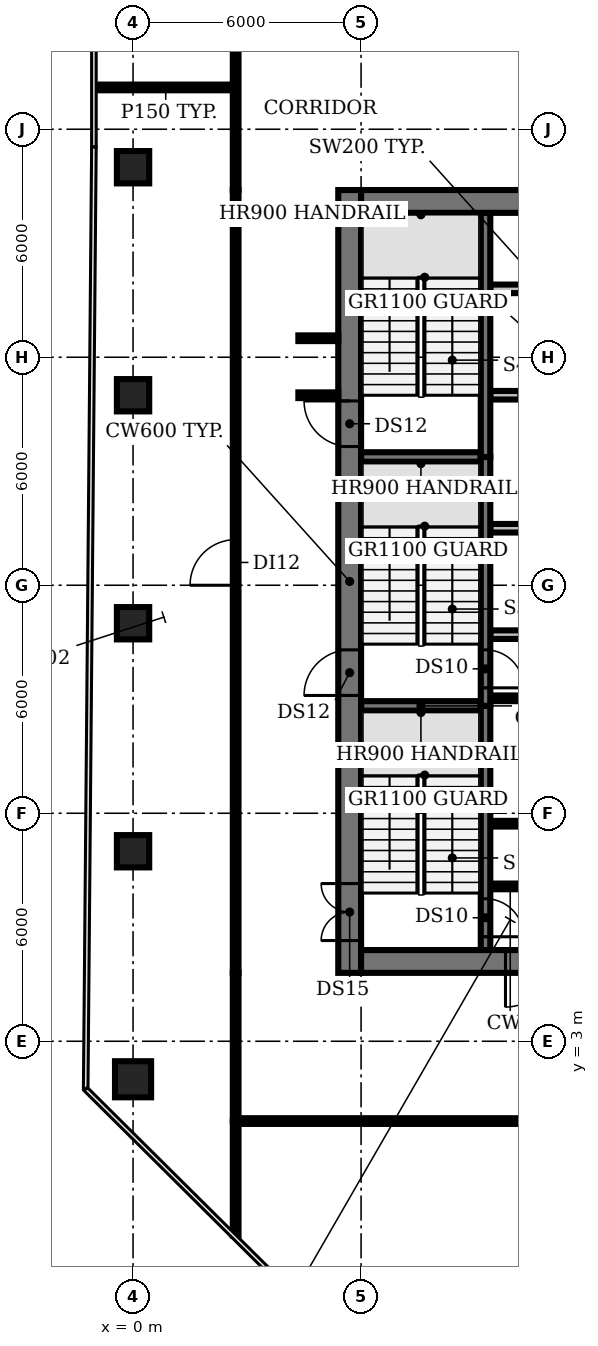
"""IFC4 building model, lengths in metres.
Left out: names, types, materials, properties, quantities, classifications, styles, units other than length and angle.
Written with IfcOpenShell. Run it as: python <this file> out.ifc"""

import sys

from ifc_helpers import new_model, si_unit, direction, frame, frame_2d, origin, origin_2d, place, context, subcontext, project, spatial, rectangle, circle, extrude, element, fill, save


model = new_model("IFC4")
c1 = context("Model", 3, precision=1e-05, world=origin(), true_north=direction((0.0, 1.0)))
c2 = subcontext(c1, "Body", "Model", "MODEL_VIEW")
j1 = project(units=[si_unit("LENGTHUNIT", "METRE"), si_unit("PLANEANGLEUNIT", "RADIAN")], contexts=[c1])
p1 = place(None, origin())
s1 = spatial("IfcSite", under=j1, at=p1, CompositionType="ELEMENT")
p2 = place(p1, origin())
s2 = spatial("IfcBuilding", under=s1, at=p2, CompositionType="ELEMENT")
p3 = place(p2, frame((0.0, 0.0, 167.6)))
s3 = spatial("IfcBuildingStorey", under=s2, at=p3, CompositionType="ELEMENT", Elevation=167.6)
p4 = place(p3, frame((0.0, 2.0, 0.0), z_axis=(0.0, 0.0, 1.0), x_axis=(1.0, 0.0, 0.0)))
e1 = element("IfcColumn", 1, at=p4, inside=s3, PredefinedType="COLUMN", context=c2, shape_type="SweptSolid", body=[
    extrude(circle(Radius=0.475, at=origin_2d()), origin(), (0.0, 0.0, 1.0), 3.85),
])
for number, where, z_axis, x_axis in (
    (2, (0.0, 8.0, 0.0), (0.0, 0.0, 1.0), (1.0, 0.0, 0.0)),
    (3, (0.0, 14.0, 0.0), (0.0, 0.0, 1.0), (1.0, 0.0, 0.0)),
    (4, (0.0, 20.0, 0.0), (0.0, 0.0, 1.0), (1.0, 0.0, 0.0)),
    (5, (0.0, 26.0, 0.0), (0.0, 0.0, 1.0), (1.0, 0.0, 0.0)),
):
    element("IfcColumn", number, at=place(p3, frame(where, z_axis=z_axis, x_axis=x_axis)), inside=s3, PredefinedType="COLUMN", context=c2, shape_type="SweptSolid", body=[
        extrude(rectangle(XDim=0.85, YDim=0.85, at=origin_2d()), origin(), (0.0, 0.0, 1.0), 3.85),
    ])
for number, where, z_axis, x_axis in (
    (6, (9.4, 7.075, 0.0), (0.0, 0.0, 1.0), (1.0, 0.0, 0.0)),
    (7, (9.4, 8.725, 0.0), (0.0, 0.0, 1.0), (1.0, 0.0, 0.0)),
    (8, (9.4, 10.375, 0.0), (0.0, 0.0, 1.0), (1.0, 0.0, 0.0)),
):
    element("IfcWall", number, at=place(p3, frame(where, z_axis=z_axis, x_axis=x_axis)), inside=s3, PredefinedType="SHEAR", context=c2, shape_type="SweptSolid", body=[
        extrude(rectangle(XDim=1.05, YDim=0.15, at=frame_2d((0.525, 0.0))), origin(), (0.0, 0.0, 1.0), 3.85),
    ])
p5 = place(p3, frame((6.0, 11.825, 0.0), z_axis=(0.0, 0.0, 1.0), x_axis=(1.0, 0.0, 0.0)))
e9 = element("IfcWall", 9, at=p5, inside=s3, PredefinedType="SHEAR", context=c2, shape_type="SweptSolid", body=[
    extrude(rectangle(XDim=3.15, YDim=0.25, at=frame_2d((1.575, 0.0))), origin(), (0.0, 0.0, 1.0), 3.85),
])
p6 = place(p3, frame((9.4, 12.025, 0.0), z_axis=(0.0, 0.0, 1.0), x_axis=(1.0, 0.0, 0.0)))
e10 = element("IfcWall", 10, at=p6, inside=s3, PredefinedType="SHEAR", context=c2, shape_type="SweptSolid", body=[
    extrude(rectangle(XDim=1.05, YDim=0.15, at=frame_2d((0.525, 0.0))), origin(), (0.0, 0.0, 1.0), 3.85),
])
p7 = place(p3, frame((9.4, 13.7, 0.0), z_axis=(0.0, 0.0, 1.0), x_axis=(1.0, 0.0, 0.0)))
e11 = element("IfcWall", 11, at=p7, inside=s3, PredefinedType="PARTITIONING", context=c2, shape_type="SweptSolid", body=[
    extrude(rectangle(XDim=4.0, YDim=0.225, at=frame_2d((2.0, 0.0))), origin(), (0.0, 0.0, 1.0), 3.85),
])
p8 = place(p3, frame((9.4, 16.5, 0.0), z_axis=(0.0, 0.0, 1.0), x_axis=(1.0, 0.0, 0.0)))
e12 = element("IfcWall", 12, at=p8, inside=s3, PredefinedType="PARTITIONING", context=c2, shape_type="SweptSolid", body=[
    extrude(rectangle(XDim=14.6, YDim=0.225, at=frame_2d((7.3, 0.0))), origin(), (0.0, 0.0, 1.0), 3.85),
])
p9 = place(p8, frame((1.6, 0.0, 0.0)))
e13 = element("IfcOpeningElement", 13, at=p9, cuts=e12, PredefinedType="OPENING", context=c2, shape_type="SweptSolid", body=[
    extrude(rectangle(XDim=1.0, YDim=2.1, at=frame_2d((0.5, 1.05))), frame((0.0, 0.123, 0.0), z_axis=(0.0, -1.0, 0.0), x_axis=(1.0, 0.0, 0.0)), (0.0, 0.0, 1.0), 0.245),
])
p10 = place(p8, frame((5.125, 0.0, 0.0)))
e14 = element("IfcOpeningElement", 14, at=p10, cuts=e12, PredefinedType="OPENING", context=c2, shape_type="SweptSolid", body=[
    extrude(rectangle(XDim=0.9, YDim=2.1, at=frame_2d((0.45, 1.05))), frame((0.0, 0.123, 0.0), z_axis=(0.0, -1.0, 0.0), x_axis=(1.0, 0.0, 0.0)), (0.0, 0.0, 1.0), 0.245),
])
p11 = place(p8, frame((7.675, 0.0, 0.0)))
e15 = element("IfcOpeningElement", 15, at=p11, cuts=e12, PredefinedType="OPENING", context=c2, shape_type="SweptSolid", body=[
    extrude(rectangle(XDim=0.9, YDim=2.1, at=frame_2d((0.45, 1.05))), frame((0.0, 0.123, 0.0), z_axis=(0.0, -1.0, 0.0), x_axis=(1.0, 0.0, 0.0)), (0.0, 0.0, 1.0), 0.245),
])
p12 = place(p8, frame((9.775, 0.0, 0.0)))
e16 = element("IfcOpeningElement", 16, at=p12, cuts=e12, PredefinedType="OPENING", context=c2, shape_type="SweptSolid", body=[
    extrude(rectangle(XDim=0.9, YDim=2.1, at=frame_2d((0.45, 1.05))), frame((0.0, 0.123, 0.0), z_axis=(0.0, -1.0, 0.0), x_axis=(1.0, 0.0, 0.0)), (0.0, 0.0, 1.0), 0.245),
])
p13 = place(p8, frame((11.647, 0.0, 0.0)))
e17 = element("IfcOpeningElement", 17, at=p13, cuts=e12, PredefinedType="OPENING", context=c2, shape_type="SweptSolid", body=[
    extrude(rectangle(XDim=0.9, YDim=2.1, at=frame_2d((0.45, 1.05))), frame((0.0, 0.123, 0.0), z_axis=(0.0, -1.0, 0.0), x_axis=(1.0, 0.0, 0.0)), (0.0, 0.0, 1.0), 0.245),
])
p14 = place(p8, frame((13.423, 0.0, 0.0)))
e18 = element("IfcOpeningElement", 18, at=p14, cuts=e12, PredefinedType="OPENING", context=c2, shape_type="SweptSolid", body=[
    extrude(rectangle(XDim=0.9, YDim=2.1, at=frame_2d((0.45, 1.05))), frame((0.0, 0.123, 0.0), z_axis=(0.0, -1.0, 0.0), x_axis=(1.0, 0.0, 0.0)), (0.0, 0.0, 1.0), 0.245),
])
p15 = place(p3, frame((6.0, 18.375, 0.0), z_axis=(0.0, 0.0, 1.0), x_axis=(1.0, 0.0, 0.0)))
e19 = element("IfcWall", 19, at=p15, inside=s3, PredefinedType="SHEAR", context=c2, shape_type="SweptSolid", body=[
    extrude(rectangle(XDim=3.15, YDim=0.25, at=frame_2d((1.575, 0.0))), origin(), (0.0, 0.0, 1.0), 3.85),
])
p16 = place(p3, frame((24.0, 20.0, 0.0), z_axis=(0.0, 0.0, 1.0), x_axis=(-1.0, 0.0, 0.0)))
e20 = element("IfcWall", 20, at=p16, inside=s3, PredefinedType="PARTITIONING", context=c2, shape_type="SweptSolid", body=[
    extrude(rectangle(XDim=14.6, YDim=0.225, at=frame_2d((7.3, 0.0))), origin(), (0.0, 0.0, 1.0), 3.85),
])
p17 = place(p16, frame((12.75, 0.0, 0.0)))
e21 = element("IfcOpeningElement", 21, at=p17, cuts=e20, PredefinedType="OPENING", context=c2, shape_type="SweptSolid", body=[
    extrude(rectangle(XDim=1.1, YDim=2.1, at=frame_2d((0.55, 1.05))), frame((0.0, 0.123, 0.0), z_axis=(0.0, -1.0, 0.0), x_axis=(1.0, 0.0, 0.0)), (0.0, 0.0, 1.0), 0.245),
])
p18 = place(p16, frame((9.95, 0.0, 0.0)))
e22 = element("IfcOpeningElement", 22, at=p18, cuts=e20, PredefinedType="OPENING", context=c2, shape_type="SweptSolid", body=[
    extrude(rectangle(XDim=1.1, YDim=2.1, at=frame_2d((0.55, 1.05))), frame((0.0, 0.123, 0.0), z_axis=(0.0, -1.0, 0.0), x_axis=(1.0, 0.0, 0.0)), (0.0, 0.0, 1.0), 0.245),
])
p19 = place(p16, frame((7.15, 0.0, 0.0)))
e23 = element("IfcOpeningElement", 23, at=p19, cuts=e20, PredefinedType="OPENING", context=c2, shape_type="SweptSolid", body=[
    extrude(rectangle(XDim=1.1, YDim=2.1, at=frame_2d((0.55, 1.05))), frame((0.0, 0.123, 0.0), z_axis=(0.0, -1.0, 0.0), x_axis=(1.0, 0.0, 0.0)), (0.0, 0.0, 1.0), 0.245),
])
p20 = place(p16, frame((4.35, 0.0, 0.0)))
e24 = element("IfcOpeningElement", 24, at=p20, cuts=e20, PredefinedType="OPENING", context=c2, shape_type="SweptSolid", body=[
    extrude(rectangle(XDim=1.1, YDim=2.1, at=frame_2d((0.55, 1.05))), frame((0.0, 0.123, 0.0), z_axis=(0.0, -1.0, 0.0), x_axis=(1.0, 0.0, 0.0)), (0.0, 0.0, 1.0), 0.245),
])
p21 = place(p16, frame((2.137, 0.0, 0.0)))
e25 = element("IfcOpeningElement", 25, at=p21, cuts=e20, PredefinedType="OPENING", context=c2, shape_type="SweptSolid", body=[
    extrude(rectangle(XDim=0.9, YDim=2.1, at=frame_2d((0.45, 1.05))), frame((0.0, 0.123, 0.0), z_axis=(0.0, -1.0, 0.0), x_axis=(1.0, 0.0, 0.0)), (0.0, 0.0, 1.0), 0.245),
])
p22 = place(p16, frame((0.363, 0.0, 0.0)))
e26 = element("IfcOpeningElement", 26, at=p22, cuts=e20, PredefinedType="OPENING", context=c2, shape_type="SweptSolid", body=[
    extrude(rectangle(XDim=0.9, YDim=2.1, at=frame_2d((0.45, 1.05))), frame((0.0, 0.123, 0.0), z_axis=(0.0, -1.0, 0.0), x_axis=(1.0, 0.0, 0.0)), (0.0, 0.0, 1.0), 0.245),
])
p23 = place(p3, frame((9.4, 22.8, 0.0), z_axis=(0.0, 0.0, 1.0), x_axis=(1.0, 0.0, 0.0)))
e27 = element("IfcWall", 27, at=p23, inside=s3, PredefinedType="PARTITIONING", context=c2, shape_type="SweptSolid", body=[
    extrude(rectangle(XDim=14.6, YDim=0.225, at=frame_2d((7.3, 0.0))), origin(), (0.0, 0.0, 1.0), 3.85),
])
p24 = place(p3, frame((9.275, 11.825, 0.0), z_axis=(0.0, 0.0, 1.0), x_axis=(0.0, -1.0, 0.0)))
e28 = element("IfcWall", 28, at=p24, inside=s3, PredefinedType="SHEAR", context=c2, shape_type="SweptSolid", body=[
    extrude(rectangle(XDim=6.425, YDim=0.25, at=frame_2d((3.212, 0.0))), origin(), (0.0, 0.0, 1.0), 3.85),
])
p25 = place(p24, frame((5.075, 0.0, 0.0)))
e29 = element("IfcOpeningElement", 29, at=p25, cuts=e28, PredefinedType="OPENING", context=c2, shape_type="SweptSolid", body=[
    extrude(rectangle(XDim=1.0, YDim=2.1, at=frame_2d((0.5, 1.05))), frame((0.0, 0.135, 0.0), z_axis=(0.0, -1.0, 0.0), x_axis=(1.0, 0.0, 0.0)), (0.0, 0.0, 1.0), 0.27),
])
p26 = place(p3, frame((9.275, 18.375, 0.0), z_axis=(0.0, 0.0, 1.0), x_axis=(0.0, -1.0, 0.0)))
e30 = element("IfcWall", 30, at=p26, inside=s3, PredefinedType="SHEAR", context=c2, shape_type="SweptSolid", body=[
    extrude(rectangle(XDim=6.55, YDim=0.25, at=frame_2d((3.275, 0.0))), origin(), (0.0, 0.0, 1.0), 3.85),
])
p27 = place(p26, frame((5.075, 0.0, 0.0)))
e31 = element("IfcOpeningElement", 31, at=p27, cuts=e30, PredefinedType="OPENING", context=c2, shape_type="SweptSolid", body=[
    extrude(rectangle(XDim=1.0, YDim=2.1, at=frame_2d((0.5, 1.05))), frame((0.0, 0.135, 0.0), z_axis=(0.0, -1.0, 0.0), x_axis=(1.0, 0.0, 0.0)), (0.0, 0.0, 1.0), 0.27),
])
p28 = place(p3, frame((9.275, 18.375, 0.0), z_axis=(0.0, 0.0, 1.0), x_axis=(0.0, 1.0, 0.0)))
e32 = element("IfcWall", 32, at=p28, inside=s3, PredefinedType="SHEAR", context=c2, shape_type="SweptSolid", body=[
    extrude(rectangle(XDim=6.425, YDim=0.25, at=frame_2d((3.212, 0.0))), origin(), (0.0, 0.0, 1.0), 3.85),
])
p29 = place(p3, frame((5.7, 4.8, 0.0), z_axis=(0.0, 0.0, 1.0), x_axis=(0.0, 1.0, 0.0)))
e33 = element("IfcWall", 33, at=p29, inside=s3, PredefinedType="SHEAR", context=c2, shape_type="SweptSolid", body=[
    extrude(rectangle(XDim=20.6, YDim=0.6, at=frame_2d((10.3, 0.0))), origin(), (0.0, 0.0, 1.0), 3.85),
])
p30 = place(p29, frame((0.85, 0.0, 0.0)))
e34 = element("IfcOpeningElement", 34, at=p30, cuts=e33, PredefinedType="OPENING", context=c2, shape_type="SweptSolid", body=[
    extrude(rectangle(XDim=1.5, YDim=2.1, at=frame_2d((0.75, 1.05))), frame((0.0, 0.31, 0.0), z_axis=(0.0, -1.0, 0.0), x_axis=(1.0, 0.0, 0.0)), (0.0, 0.0, 1.0), 0.62),
])
p31 = place(p29, frame((7.3, 0.0, 0.0)))
e35 = element("IfcOpeningElement", 35, at=p31, cuts=e33, PredefinedType="OPENING", context=c2, shape_type="SweptSolid", body=[
    extrude(rectangle(XDim=1.2, YDim=2.1, at=frame_2d((0.6, 1.05))), frame((0.0, 0.31, 0.0), z_axis=(0.0, -1.0, 0.0), x_axis=(1.0, 0.0, 0.0)), (0.0, 0.0, 1.0), 0.62),
])
p32 = place(p29, frame((13.85, 0.0, 0.0)))
e36 = element("IfcOpeningElement", 36, at=p32, cuts=e33, PredefinedType="OPENING", context=c2, shape_type="SweptSolid", body=[
    extrude(rectangle(XDim=1.2, YDim=2.1, at=frame_2d((0.6, 1.05))), frame((0.0, 0.31, 0.0), z_axis=(0.0, -1.0, 0.0), x_axis=(1.0, 0.0, 0.0)), (0.0, 0.0, 1.0), 0.62),
])
p33 = place(p3, frame((24.0, 5.1, 0.0), z_axis=(0.0, 0.0, 1.0), x_axis=(-1.0, 0.0, 0.0)))
e37 = element("IfcWall", 37, at=p33, inside=s3, PredefinedType="SHEAR", context=c2, shape_type="SweptSolid", body=[
    extrude(rectangle(XDim=18.0, YDim=0.6, at=frame_2d((9.0, 0.0))), origin(), (0.0, 0.0, 1.0), 3.85),
])
p34 = place(p33, frame((13.0, 0.0, 0.0)))
e38 = element("IfcOpeningElement", 38, at=p34, cuts=e37, PredefinedType="OPENING", context=c2, shape_type="SweptSolid", body=[
    extrude(rectangle(XDim=1.2, YDim=2.1, at=frame_2d((0.6, 1.05))), frame((0.0, 0.31, 0.0), z_axis=(0.0, -1.0, 0.0), x_axis=(1.0, 0.0, 0.0)), (0.0, 0.0, 1.0), 0.62),
])
p35 = place(p33, frame((4.9, 0.0, 0.0)))
e39 = element("IfcOpeningElement", 39, at=p35, cuts=e37, PredefinedType="OPENING", context=c2, shape_type="SweptSolid", body=[
    extrude(rectangle(XDim=1.0, YDim=2.1, at=frame_2d((0.5, 1.05))), frame((0.0, 0.31, 0.0), z_axis=(0.0, -1.0, 0.0), x_axis=(1.0, 0.0, 0.0)), (0.0, 0.0, 1.0), 0.62),
])
p36 = place(p3, frame((6.0, 25.1, 0.0), z_axis=(0.0, 0.0, 1.0), x_axis=(1.0, 0.0, 0.0)))
e40 = element("IfcWall", 40, at=p36, inside=s3, PredefinedType="SHEAR", context=c2, shape_type="SweptSolid", body=[
    extrude(rectangle(XDim=18.0, YDim=0.6, at=frame_2d((9.0, 0.0))), origin(), (0.0, 0.0, 1.0), 3.85),
])
p37 = place(p3, frame((-0.98, 28.1, 0.0), z_axis=(0.0, 0.0, 1.0), x_axis=(1.0, 0.0, 0.0)))
e41 = element("IfcWall", 41, at=p37, inside=s3, PredefinedType="PARTITIONING", context=c2, shape_type="SweptSolid", body=[
    extrude(rectangle(XDim=3.68, YDim=0.15, at=frame_2d((1.84, 0.0))), origin(), (0.0, 0.0, 1.0), 2.88),
])
p38 = place(p3, frame((2.7, -2.11, 0.0), z_axis=(0.0, 0.0, 1.0), x_axis=(0.0, 1.0, 0.0)))
e42 = element("IfcWall", 42, at=p38, inside=s3, PredefinedType="PARTITIONING", context=c2, shape_type="SweptSolid", body=[
    extrude(rectangle(XDim=3.01, YDim=0.15, at=frame_2d((1.505, 0.0))), origin(), (0.0, 0.0, 1.0), 2.88),
])
p39 = place(p3, frame((2.7, 0.9, 0.0), z_axis=(0.0, 0.0, 1.0), x_axis=(0.0, 1.0, 0.0)))
e43 = element("IfcWall", 43, at=p39, inside=s3, PredefinedType="PARTITIONING", context=c2, shape_type="SweptSolid", body=[
    extrude(rectangle(XDim=3.9, YDim=0.15, at=frame_2d((1.95, 0.0))), origin(), (0.0, 0.0, 1.0), 2.88),
])
p40 = place(p3, frame((2.7, 4.8, 0.0), z_axis=(0.0, 0.0, 1.0), x_axis=(0.0, 1.0, 0.0)))
e44 = element("IfcWall", 44, at=p40, inside=s3, PredefinedType="PARTITIONING", context=c2, shape_type="SweptSolid", body=[
    extrude(rectangle(XDim=20.6, YDim=0.15, at=frame_2d((10.3, 0.0))), origin(), (0.0, 0.0, 1.0), 2.88),
])
p41 = place(p40, frame((10.2, 0.0, 0.0)))
e45 = element("IfcOpeningElement", 45, at=p41, cuts=e44, PredefinedType="OPENING", context=c2, shape_type="SweptSolid", body=[
    extrude(rectangle(XDim=1.2, YDim=2.1, at=frame_2d((0.6, 1.05))), frame((0.0, 0.085, 0.0), z_axis=(0.0, -1.0, 0.0), x_axis=(1.0, 0.0, 0.0)), (0.0, 0.0, 1.0), 0.17),
])
p42 = place(p3, frame((2.7, 25.4, 0.0), z_axis=(0.0, 0.0, 1.0), x_axis=(0.0, 1.0, 0.0)))
e46 = element("IfcWall", 46, at=p42, inside=s3, PredefinedType="PARTITIONING", context=c2, shape_type="SweptSolid", body=[
    extrude(rectangle(XDim=3.9, YDim=0.15, at=frame_2d((1.95, 0.0))), origin(), (0.0, 0.0, 1.0), 2.88),
])
for number, where, z_axis, x_axis in (
    (47, (4.35, 20.0, 0.0), (0.0, 0.0, 1.0), (1.0, 0.0, 0.0)),
    (48, (4.35, 21.5, 0.0), (0.0, 0.0, 1.0), (1.0, 0.0, 0.0)),
):
    element("IfcWall", number, at=place(p3, frame(where, z_axis=z_axis, x_axis=x_axis)), inside=s3, PredefinedType="PARTITIONING", context=c2, shape_type="SweptSolid", body=[
        extrude(rectangle(XDim=1.05, YDim=0.15, at=frame_2d((0.525, 0.0))), origin(), (0.0, 0.0, 1.0), 2.88),
    ])
p43 = place(p3, frame((27.3, 0.9, 0.0), z_axis=(0.0, 0.0, 1.0), x_axis=(-1.0, 0.0, 0.0)))
e49 = element("IfcWall", 49, at=p43, inside=s3, PredefinedType="PARTITIONING", context=c2, shape_type="SweptSolid", body=[
    extrude(rectangle(XDim=24.6, YDim=0.15, at=frame_2d((12.3, 0.0))), origin(), (0.0, 0.0, 1.0), 2.88),
])
p44 = place(p43, frame((11.8, 0.0, 0.0)))
e50 = element("IfcOpeningElement", 50, at=p44, cuts=e49, PredefinedType="OPENING", context=c2, shape_type="SweptSolid", body=[
    extrude(rectangle(XDim=1.2, YDim=2.1, at=frame_2d((0.6, 1.05))), frame((0.0, 0.085, 0.0), z_axis=(0.0, -1.0, 0.0), x_axis=(1.0, 0.0, 0.0)), (0.0, 0.0, 1.0), 0.17),
])
p45 = place(p25, origin())
e51 = element("IfcDoor", 51, at=p45, inside=s3, OperationType="SINGLE_SWING_RIGHT", PredefinedType="DOOR", context=c2, shape_type="SweptSolid", body=[
    extrude(rectangle(XDim=1.0, YDim=2.1, at=frame_2d((0.5, 1.05))), frame((0.0, 0.025, 0.0), z_axis=(0.0, -1.0, 0.0), x_axis=(1.0, 0.0, 0.0)), (0.0, 0.0, 1.0), 0.05),
])
fill(e29, e51)
p46 = place(p27, origin())
e52 = element("IfcDoor", 52, at=p46, inside=s3, OperationType="SINGLE_SWING_RIGHT", PredefinedType="DOOR", context=c2, shape_type="SweptSolid", body=[
    extrude(rectangle(XDim=1.0, YDim=2.1, at=frame_2d((0.5, 1.05))), frame((0.0, 0.025, 0.0), z_axis=(0.0, -1.0, 0.0), x_axis=(1.0, 0.0, 0.0)), (0.0, 0.0, 1.0), 0.05),
])
fill(e31, e52)
p47 = place(p30, origin())
e53 = element("IfcDoor", 53, at=p47, inside=s3, OperationType="DOUBLE_DOOR_SINGLE_SWING", PredefinedType="DOOR", context=c2, shape_type="SweptSolid", body=[
    extrude(rectangle(XDim=1.5, YDim=2.1, at=frame_2d((0.75, 1.05))), frame((0.0, 0.025, 0.0), z_axis=(0.0, -1.0, 0.0), x_axis=(1.0, 0.0, 0.0)), (0.0, 0.0, 1.0), 0.05),
])
fill(e34, e53)
p48 = place(p31, origin())
e54 = element("IfcDoor", 54, at=p48, inside=s3, OperationType="SINGLE_SWING_LEFT", PredefinedType="DOOR", context=c2, shape_type="SweptSolid", body=[
    extrude(rectangle(XDim=1.2, YDim=2.1, at=frame_2d((0.6, 1.05))), frame((0.0, 0.025, 0.0), z_axis=(0.0, -1.0, 0.0), x_axis=(1.0, 0.0, 0.0)), (0.0, 0.0, 1.0), 0.05),
])
fill(e35, e54)
p49 = place(p32, origin())
e55 = element("IfcDoor", 55, at=p49, inside=s3, OperationType="SINGLE_SWING_RIGHT", PredefinedType="DOOR", context=c2, shape_type="SweptSolid", body=[
    extrude(rectangle(XDim=1.2, YDim=2.1, at=frame_2d((0.6, 1.05))), frame((0.0, 0.025, 0.0), z_axis=(0.0, -1.0, 0.0), x_axis=(1.0, 0.0, 0.0)), (0.0, 0.0, 1.0), 0.05),
])
fill(e36, e55)
p50 = place(p34, origin())
e56 = element("IfcDoor", 56, at=p50, inside=s3, OperationType="SINGLE_SWING_RIGHT", PredefinedType="DOOR", context=c2, shape_type="SweptSolid", body=[
    extrude(rectangle(XDim=1.2, YDim=2.1, at=frame_2d((0.6, 1.05))), frame((0.0, 0.025, 0.0), z_axis=(0.0, -1.0, 0.0), x_axis=(1.0, 0.0, 0.0)), (0.0, 0.0, 1.0), 0.05),
])
fill(e38, e56)
p51 = place(p41, origin())
e57 = element("IfcDoor", 57, at=p51, inside=s3, OperationType="SINGLE_SWING_LEFT", PredefinedType="DOOR", context=c2, shape_type="SweptSolid", body=[
    extrude(rectangle(XDim=1.2, YDim=2.1, at=frame_2d((0.6, 1.05))), frame((0.0, 0.025, 0.0), z_axis=(0.0, -1.0, 0.0), x_axis=(1.0, 0.0, 0.0)), (0.0, 0.0, 1.0), 0.05),
])
fill(e45, e57)
save(model, sys.argv[1])
